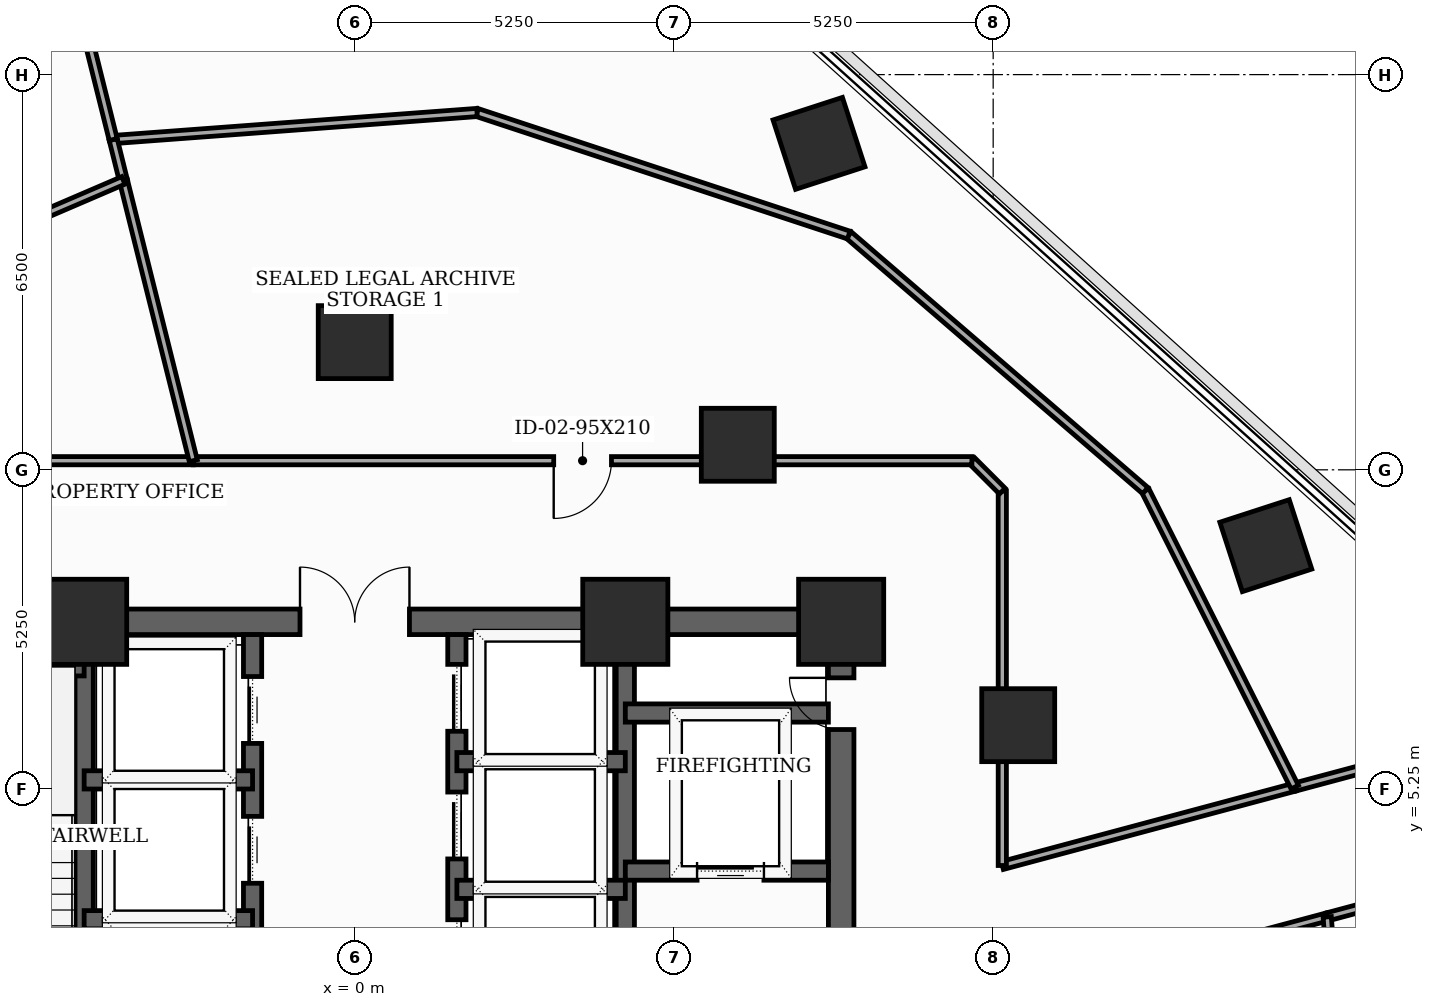
"""IFC4 building model, lengths in metres.
Left out: names, types, materials, properties, quantities, classifications, styles, units other than length and angle.
Written with IfcOpenShell. Run it as: python <this file> out.ifc"""

import sys

from ifc_helpers import new_model, si_unit, direction, frame, frame_2d, origin, origin_2d, place, context, subcontext, project, spatial, rectangle, extrude, element, fill, save


model = new_model("IFC4")
c1 = context("Model", 3, precision=1e-05, world=origin(), true_north=direction((0.0, 1.0)))
c2 = subcontext(c1, "Body", "Model", "MODEL_VIEW")
j1 = project(units=[si_unit("LENGTHUNIT", "METRE"), si_unit("PLANEANGLEUNIT", "RADIAN")], contexts=[c1])
p1 = place(None, origin())
s1 = spatial("IfcSite", under=j1, at=p1, CompositionType="ELEMENT")
p2 = place(p1, origin())
s2 = spatial("IfcBuilding", under=s1, at=p2, CompositionType="ELEMENT")
p3 = place(p2, frame((0.0, 0.0, 112.5)))
s3 = spatial("IfcBuildingStorey", under=s2, at=p3, CompositionType="ELEMENT", Elevation=112.5)
for number, where, z_axis, x_axis in (
    (1, (8.0, 8.0, 0.0), (0.0, 0.0, 1.0), (1.0, 0.0, 0.0)),
    (2, (4.45, 8.0, 0.0), (0.0, 0.0, 1.0), (1.0, 0.0, 0.0)),
    (3, (-4.45, 8.0, 0.0), (0.0, 0.0, 1.0), (1.0, 0.0, 0.0)),
):
    element("IfcColumn", number, at=place(p3, frame(where, z_axis=z_axis, x_axis=x_axis)), inside=s3, PredefinedType="COLUMN", context=c2, shape_type="SweptSolid", body=[
        extrude(rectangle(XDim=1.4, YDim=1.4, at=origin_2d()), origin(), (0.0, 0.0, 1.0), 3.7),
    ])
for number, where, z_axis, x_axis in (
    (4, (10.912, 6.3, 0.0), (0.0, 0.0, 1.0), (1.0, 0.0, 0.0)),
    (5, (6.3, 10.912, 0.0), (0.0, 0.0, 1.0), (1.0, 0.0, 0.0)),
    (6, (0.0, 12.6, 0.0), (0.0, 0.0, 1.0), (1.0, 0.0, 0.0)),
    (7, (14.984, 9.252, 0.0), (0.0, 0.0, 1.0), (0.951, 0.309, 0.0)),
    (8, (7.635, 15.869, 0.0), (0.0, 0.0, 1.0), (0.951, 0.309, 0.0)),
):
    element("IfcColumn", number, at=place(p3, frame(where, z_axis=z_axis, x_axis=x_axis)), inside=s3, PredefinedType="COLUMN", context=c2, shape_type="SweptSolid", body=[
        extrude(rectangle(XDim=1.2, YDim=1.2, at=origin_2d()), origin(), (0.0, 0.0, 1.0), 3.7),
    ])
p4 = place(p3, frame((8.0, -8.0, 0.0), z_axis=(0.0, 0.0, 1.0), x_axis=(0.0, 1.0, 0.0)))
e9 = element("IfcWall", 9, at=p4, inside=s3, PredefinedType="SHEAR", context=c2, shape_type="SweptSolid", body=[
    extrude(rectangle(XDim=16.0, YDim=0.42, at=frame_2d((8.0, 0.0))), origin(), (0.0, 0.0, 1.0), 3.5),
])
p5 = place(p4, frame((9.6, 0.0, 0.0)))
e10 = element("IfcOpeningElement", 10, at=p5, cuts=e9, PredefinedType="OPENING", context=c2, shape_type="SweptSolid", body=[
    extrude(rectangle(XDim=1.05, YDim=2.15, at=frame_2d((0.525, 1.075))), frame((0.0, 0.22, 0.0), z_axis=(0.0, -1.0, 0.0), x_axis=(1.0, 0.0, 0.0)), (0.0, 0.0, 1.0), 0.44),
])
p6 = place(p4, frame((14.229, 0.0, 0.0)))
e11 = element("IfcOpeningElement", 11, at=p6, cuts=e9, PredefinedType="OPENING", context=c2, shape_type="SweptSolid", body=[
    extrude(rectangle(XDim=0.85, YDim=2.02, at=frame_2d((0.425, 1.01))), frame((0.0, 0.22, 0.0), z_axis=(0.0, -1.0, 0.0), x_axis=(1.0, 0.0, 0.0)), (0.0, 0.0, 1.0), 0.44),
])
p7 = place(p3, frame((-8.0, 8.0, 0.0), z_axis=(0.0, 0.0, 1.0), x_axis=(1.0, 0.0, 0.0)))
e12 = element("IfcWall", 12, at=p7, inside=s3, PredefinedType="SHEAR", context=c2, shape_type="SweptSolid", body=[
    extrude(rectangle(XDim=16.0, YDim=0.42, at=frame_2d((8.0, 0.0))), origin(), (0.0, 0.0, 1.0), 3.5),
])
p8 = place(p7, frame((7.1, 0.0, 0.0)))
e13 = element("IfcOpeningElement", 13, at=p8, cuts=e12, PredefinedType="OPENING", context=c2, shape_type="SweptSolid", body=[
    extrude(rectangle(XDim=1.8, YDim=2.15, at=frame_2d((0.9, 1.075))), frame((0.0, 0.22, 0.0), z_axis=(0.0, -1.0, 0.0), x_axis=(1.0, 0.0, 0.0)), (0.0, 0.0, 1.0), 0.44),
])
for number, where, z_axis, x_axis in (
    (14, (-4.45, -7.79, 0.0), (0.0, 0.0, 1.0), (0.0, 1.0, 0.0)),
    (15, (4.45, -7.79, 0.0), (0.0, 0.0, 1.0), (0.0, 1.0, 0.0)),
):
    element("IfcWall", number, at=place(p3, frame(where, z_axis=z_axis, x_axis=x_axis)), inside=s3, PredefinedType="SHEAR", context=c2, shape_type="SweptSolid", body=[
        extrude(rectangle(XDim=15.58, YDim=0.3, at=frame_2d((7.79, 0.0))), origin(), (0.0, 0.0, 1.0), 3.5),
    ])
p9 = place(p3, frame((-7.79, 7.26, 0.0), z_axis=(0.0, 0.0, 1.0), x_axis=(1.0, 0.0, 0.0)))
e16 = element("IfcWall", 16, at=p9, inside=s3, PredefinedType="SHEAR", context=c2, shape_type="SweptSolid", body=[
    extrude(rectangle(XDim=3.34, YDim=0.3, at=frame_2d((1.67, 0.0))), origin(), (0.0, 0.0, 1.0), 3.5),
])
p10 = place(p3, frame((4.45, 3.9, 0.0), z_axis=(0.0, 0.0, 1.0), x_axis=(1.0, 0.0, 0.0)))
e17 = element("IfcWall", 17, at=p10, inside=s3, PredefinedType="SHEAR", context=c2, shape_type="SweptSolid", body=[
    extrude(rectangle(XDim=3.34, YDim=0.3, at=frame_2d((1.67, 0.0))), origin(), (0.0, 0.0, 1.0), 3.5),
])
p11 = place(p10, frame((1.18, 0.0, 0.0)))
e18 = element("IfcOpeningElement", 18, at=p11, cuts=e17, PredefinedType="OPENING", context=c2, shape_type="SweptSolid", body=[
    extrude(rectangle(XDim=1.1, YDim=2.1, at=frame_2d((0.55, 1.05))), frame((0.0, 0.16, 0.0), z_axis=(0.0, -1.0, 0.0), x_axis=(1.0, 0.0, 0.0)), (0.0, 0.0, 1.0), 0.32),
])
p12 = place(p3, frame((4.45, 6.5, 0.0), z_axis=(0.0, 0.0, 1.0), x_axis=(1.0, 0.0, 0.0)))
e19 = element("IfcWall", 19, at=p12, inside=s3, PredefinedType="SHEAR", context=c2, shape_type="SweptSolid", body=[
    extrude(rectangle(XDim=3.34, YDim=0.3, at=frame_2d((1.67, 0.0))), origin(), (0.0, 0.0, 1.0), 3.5),
])
p13 = place(p3, frame((-1.68, -4.85, 0.0), z_axis=(0.0, 0.0, 1.0), x_axis=(0.0, 1.0, 0.0)))
e20 = element("IfcWall", 20, at=p13, inside=s3, PredefinedType="SHEAR", context=c2, shape_type="SweptSolid", body=[
    extrude(rectangle(XDim=12.64, YDim=0.3, at=frame_2d((6.32, 0.0))), origin(), (0.0, 0.0, 1.0), 3.5),
])
p14 = place(p13, frame((3.95, 0.0, 0.0)))
e21 = element("IfcOpeningElement", 21, at=p14, cuts=e20, PredefinedType="OPENING", context=c2, shape_type="SweptSolid", body=[
    extrude(rectangle(XDim=1.1, YDim=2.1, at=frame_2d((0.55, 1.05))), frame((0.0, 0.16, 0.0), z_axis=(0.0, -1.0, 0.0), x_axis=(1.0, 0.0, 0.0)), (0.0, 0.0, 1.0), 0.32),
])
p15 = place(p13, frame((6.25, 0.0, 0.0)))
e22 = element("IfcOpeningElement", 22, at=p15, cuts=e20, PredefinedType="OPENING", context=c2, shape_type="SweptSolid", body=[
    extrude(rectangle(XDim=1.1, YDim=2.1, at=frame_2d((0.55, 1.05))), frame((0.0, 0.16, 0.0), z_axis=(0.0, -1.0, 0.0), x_axis=(1.0, 0.0, 0.0)), (0.0, 0.0, 1.0), 0.32),
])
p16 = place(p13, frame((8.55, 0.0, 0.0)))
e23 = element("IfcOpeningElement", 23, at=p16, cuts=e20, PredefinedType="OPENING", context=c2, shape_type="SweptSolid", body=[
    extrude(rectangle(XDim=1.1, YDim=2.1, at=frame_2d((0.55, 1.05))), frame((0.0, 0.16, 0.0), z_axis=(0.0, -1.0, 0.0), x_axis=(1.0, 0.0, 0.0)), (0.0, 0.0, 1.0), 0.32),
])
p17 = place(p13, frame((10.85, 0.0, 0.0)))
e24 = element("IfcOpeningElement", 24, at=p17, cuts=e20, PredefinedType="OPENING", context=c2, shape_type="SweptSolid", body=[
    extrude(rectangle(XDim=1.1, YDim=2.1, at=frame_2d((0.55, 1.05))), frame((0.0, 0.16, 0.0), z_axis=(0.0, -1.0, 0.0), x_axis=(1.0, 0.0, 0.0)), (0.0, 0.0, 1.0), 0.32),
])
p18 = place(p13, frame((0.45, 0.0, 0.0)))
e25 = element("IfcOpeningElement", 25, at=p18, cuts=e20, PredefinedType="OPENING", context=c2, shape_type="SweptSolid", body=[
    extrude(rectangle(XDim=0.85, YDim=2.02, at=frame_2d((0.425, 1.01))), frame((0.0, 0.16, 0.0), z_axis=(0.0, -1.0, 0.0), x_axis=(1.0, 0.0, 0.0)), (0.0, 0.0, 1.0), 0.32),
])
p19 = place(p13, frame((2.05, 0.0, 0.0)))
e26 = element("IfcOpeningElement", 26, at=p19, cuts=e20, PredefinedType="OPENING", context=c2, shape_type="SweptSolid", body=[
    extrude(rectangle(XDim=0.85, YDim=2.02, at=frame_2d((0.425, 1.01))), frame((0.0, 0.16, 0.0), z_axis=(0.0, -1.0, 0.0), x_axis=(1.0, 0.0, 0.0)), (0.0, 0.0, 1.0), 0.32),
])
p20 = place(p3, frame((1.68, -4.85, 0.0), z_axis=(0.0, 0.0, 1.0), x_axis=(0.0, 1.0, 0.0)))
e27 = element("IfcWall", 27, at=p20, inside=s3, PredefinedType="SHEAR", context=c2, shape_type="SweptSolid", body=[
    extrude(rectangle(XDim=12.64, YDim=0.3, at=frame_2d((6.32, 0.0))), origin(), (0.0, 0.0, 1.0), 3.5),
])
p21 = place(p20, frame((0.55, 0.0, 0.0)))
e28 = element("IfcOpeningElement", 28, at=p21, cuts=e27, PredefinedType="OPENING", context=c2, shape_type="SweptSolid", body=[
    extrude(rectangle(XDim=1.1, YDim=2.1, at=frame_2d((0.55, 1.05))), frame((0.0, 0.16, 0.0), z_axis=(0.0, -1.0, 0.0), x_axis=(1.0, 0.0, 0.0)), (0.0, 0.0, 1.0), 0.32),
])
p22 = place(p20, frame((2.65, 0.0, 0.0)))
e29 = element("IfcOpeningElement", 29, at=p22, cuts=e27, PredefinedType="OPENING", context=c2, shape_type="SweptSolid", body=[
    extrude(rectangle(XDim=1.1, YDim=2.1, at=frame_2d((0.55, 1.05))), frame((0.0, 0.16, 0.0), z_axis=(0.0, -1.0, 0.0), x_axis=(1.0, 0.0, 0.0)), (0.0, 0.0, 1.0), 0.32),
])
p23 = place(p20, frame((4.75, 0.0, 0.0)))
e30 = element("IfcOpeningElement", 30, at=p23, cuts=e27, PredefinedType="OPENING", context=c2, shape_type="SweptSolid", body=[
    extrude(rectangle(XDim=1.1, YDim=2.1, at=frame_2d((0.55, 1.05))), frame((0.0, 0.16, 0.0), z_axis=(0.0, -1.0, 0.0), x_axis=(1.0, 0.0, 0.0)), (0.0, 0.0, 1.0), 0.32),
])
p24 = place(p20, frame((6.85, 0.0, 0.0)))
e31 = element("IfcOpeningElement", 31, at=p24, cuts=e27, PredefinedType="OPENING", context=c2, shape_type="SweptSolid", body=[
    extrude(rectangle(XDim=1.1, YDim=2.1, at=frame_2d((0.55, 1.05))), frame((0.0, 0.16, 0.0), z_axis=(0.0, -1.0, 0.0), x_axis=(1.0, 0.0, 0.0)), (0.0, 0.0, 1.0), 0.32),
])
p25 = place(p20, frame((8.95, 0.0, 0.0)))
e32 = element("IfcOpeningElement", 32, at=p25, cuts=e27, PredefinedType="OPENING", context=c2, shape_type="SweptSolid", body=[
    extrude(rectangle(XDim=1.1, YDim=2.1, at=frame_2d((0.55, 1.05))), frame((0.0, 0.16, 0.0), z_axis=(0.0, -1.0, 0.0), x_axis=(1.0, 0.0, 0.0)), (0.0, 0.0, 1.0), 0.32),
])
p26 = place(p20, frame((11.05, 0.0, 0.0)))
e33 = element("IfcOpeningElement", 33, at=p26, cuts=e27, PredefinedType="OPENING", context=c2, shape_type="SweptSolid", body=[
    extrude(rectangle(XDim=1.1, YDim=2.1, at=frame_2d((0.55, 1.05))), frame((0.0, 0.16, 0.0), z_axis=(0.0, -1.0, 0.0), x_axis=(1.0, 0.0, 0.0)), (0.0, 0.0, 1.0), 0.32),
])
for number, where, z_axis, x_axis in (
    (34, (-4.45, 3.1, 0.0), (0.0, 0.0, 1.0), (1.0, 0.0, 0.0)),
    (35, (-4.45, 5.4, 0.0), (0.0, 0.0, 1.0), (1.0, 0.0, 0.0)),
    (36, (1.68, 3.6, 0.0), (0.0, 0.0, 1.0), (1.0, 0.0, 0.0)),
    (37, (1.68, 5.7, 0.0), (0.0, 0.0, 1.0), (1.0, 0.0, 0.0)),
):
    element("IfcWall", number, at=place(p3, frame(where, z_axis=z_axis, x_axis=x_axis)), inside=s3, PredefinedType="SHEAR", context=c2, shape_type="SweptSolid", body=[
        extrude(rectangle(XDim=2.77, YDim=0.3, at=frame_2d((1.385, 0.0))), origin(), (0.0, 0.0, 1.0), 3.5),
    ])
p27 = place(p3, frame((15.46, 5.281, 0.0), z_axis=(0.0, 0.0, 1.0), x_axis=(-0.96591522342, -0.258858612306, 0.0)))
e38 = element("IfcWall", 38, at=p27, inside=s3, PredefinedType="PARTITIONING", context=c2, shape_type="SweptSolid", body=[
    extrude(rectangle(XDim=4.98, YDim=0.135, at=frame_2d((2.49, 0.0))), origin(), (0.0, 0.0, 1.0), 2.785),
])
p28 = place(p3, frame((10.65, 3.992, 0.0), z_axis=(0.0, 0.0, 1.0), x_axis=(0.0, 1.0, 0.0)))
e39 = element("IfcWall", 39, at=p28, inside=s3, PredefinedType="PARTITIONING", context=c2, shape_type="SweptSolid", body=[
    extrude(rectangle(XDim=6.158, YDim=0.135, at=frame_2d((3.079, 0.0))), origin(), (0.0, 0.0, 1.0), 2.785),
])
p29 = place(p3, frame((10.65, 10.15, 0.0), z_axis=(0.0, 0.0, 1.0), x_axis=(-0.707106781187, 0.707106781187, 0.0)))
e40 = element("IfcWall", 40, at=p29, inside=s3, PredefinedType="PARTITIONING", context=c2, shape_type="SweptSolid", body=[
    extrude(rectangle(XDim=0.707, YDim=0.135, at=frame_2d((0.354, 0.0))), origin(), (0.0, 0.0, 1.0), 3.125),
])
p30 = place(p3, frame((10.15, 10.65, 0.0), z_axis=(0.0, 0.0, 1.0), x_axis=(-1.0, 0.0, 0.0)))
e41 = element("IfcWall", 41, at=p30, inside=s3, PredefinedType="PARTITIONING", context=c2, shape_type="SweptSolid", body=[
    extrude(rectangle(XDim=12.805, YDim=0.135, at=frame_2d((6.402, 0.0))), origin(), (0.0, 0.0, 1.0), 2.785),
])
p31 = place(p30, frame((5.927, 0.0, 0.0)))
e42 = element("IfcOpeningElement", 42, at=p31, cuts=e41, PredefinedType="OPENING", context=c2, shape_type="SweptSolid", body=[
    extrude(rectangle(XDim=0.95, YDim=2.1, at=frame_2d((0.475, 1.05))), frame((0.0, 0.077, 0.0), z_axis=(0.0, -1.0, 0.0), x_axis=(1.0, 0.0, 0.0)), (0.0, 0.0, 1.0), 0.155),
])
p32 = place(p3, frame((15.994, 3.147, 0.0), z_axis=(0.0, 0.0, 1.0), x_axis=(0.965977255775, 0.258627031314, 0.0)))
e43 = element("IfcWall", 43, at=p32, inside=s3, PredefinedType="PARTITIONING", context=c2, shape_type="SweptSolid", body=[
    extrude(rectangle(XDim=2.536, YDim=0.135, at=frame_2d((1.268, 0.0))), origin(), (0.0, 0.0, 1.0), 3.125),
])
p33 = place(p3, frame((17.875, 5.928, 0.0), z_axis=(0.0, 0.0, 1.0), x_axis=(-0.96593933493, -0.258768624905, 0.0)))
e44 = element("IfcWall", 44, at=p33, inside=s3, PredefinedType="PARTITIONING", context=c2, shape_type="SweptSolid", body=[
    extrude(rectangle(XDim=2.5, YDim=0.135, at=frame_2d((1.25, 0.0))), origin(), (0.0, 0.0, 1.0), 3.5),
])
p34 = place(p3, frame((10.65, 1.715, 0.0), z_axis=(0.0, 0.0, 1.0), x_axis=(0.965927369368, 0.258813286187, 0.0)))
e45 = element("IfcWall", 45, at=p34, inside=s3, PredefinedType="PARTITIONING", context=c2, shape_type="SweptSolid", body=[
    extrude(rectangle(XDim=5.532, YDim=0.135, at=frame_2d((2.766, 0.0))), origin(), (0.0, 0.0, 1.0), 2.785),
])
p35 = place(p3, frame((-2.655, 10.65, 0.0), z_axis=(0.0, 0.0, 1.0), x_axis=(-1.0, 0.0, 0.0)))
e46 = element("IfcWall", 46, at=p35, inside=s3, PredefinedType="PARTITIONING", context=c2, shape_type="SweptSolid", body=[
    extrude(rectangle(XDim=7.495, YDim=0.135, at=frame_2d((3.748, 0.0))), origin(), (0.0, 0.0, 1.0), 2.785),
])
p36 = place(p3, frame((15.46, 5.281, 0.0), z_axis=(0.0, 0.0, 1.0), x_axis=(-0.45007231558, 0.892992111246, 0.0)))
e47 = element("IfcWall", 47, at=p36, inside=s3, PredefinedType="PARTITIONING", context=c2, shape_type="SweptSolid", body=[
    extrude(rectangle(XDim=5.461, YDim=0.135, at=frame_2d((2.731, 0.0))), origin(), (0.0, 0.0, 1.0), 2.785),
])
p37 = place(p3, frame((13.002, 10.158, 0.0), z_axis=(0.0, 0.0, 1.0), x_axis=(-0.757497901086, 0.652837598373, 0.0)))
e48 = element("IfcWall", 48, at=p37, inside=s3, PredefinedType="PARTITIONING", context=c2, shape_type="SweptSolid", body=[
    extrude(rectangle(XDim=6.438, YDim=0.135, at=frame_2d((3.219, 0.0))), origin(), (0.0, 0.0, 1.0), 3.5),
])
p38 = place(p3, frame((8.125, 14.361, 0.0), z_axis=(0.0, 0.0, 1.0), x_axis=(-0.949709761003, 0.313131553592, 0.0)))
e49 = element("IfcWall", 49, at=p38, inside=s3, PredefinedType="PARTITIONING", context=c2, shape_type="SweptSolid", body=[
    extrude(rectangle(XDim=6.438, YDim=0.135, at=frame_2d((3.219, 0.0))), origin(), (0.0, 0.0, 1.0), 2.785),
])
p39 = place(p3, frame((2.011, 16.377, 0.0), z_axis=(0.0, 0.0, 1.0), x_axis=(-0.997244499183, -0.074184963764, 0.0)))
e50 = element("IfcWall", 50, at=p39, inside=s3, PredefinedType="PARTITIONING", context=c2, shape_type="SweptSolid", body=[
    extrude(rectangle(XDim=6.0, YDim=0.135, at=frame_2d((3.0, 0.0))), origin(), (0.0, 0.0, 1.0), 2.785),
])
p40 = place(p3, frame((-3.972, 15.932, 0.0), z_axis=(0.0, 0.0, 1.0), x_axis=(0.241207800827, -0.970473491045, 0.0)))
e51 = element("IfcWall", 51, at=p40, inside=s3, PredefinedType="PARTITIONING", context=c2, shape_type="SweptSolid", body=[
    extrude(rectangle(XDim=0.692, YDim=0.135, at=frame_2d((0.346, 0.0))), origin(), (0.0, 0.0, 1.0), 3.5),
])
p41 = place(p3, frame((-3.805, 15.26, 0.0), z_axis=(0.0, 0.0, 1.0), x_axis=(0.242015711327, -0.970272330571, 0.0)))
e52 = element("IfcWall", 52, at=p41, inside=s3, PredefinedType="PARTITIONING", context=c2, shape_type="SweptSolid", body=[
    extrude(rectangle(XDim=4.751, YDim=0.135, at=frame_2d((2.376, 0.0))), origin(), (0.0, 0.0, 1.0), 2.785),
])
p42 = place(p3, frame((15.994, 3.147, 0.0), z_axis=(0.0, 0.0, 1.0), x_axis=(0.074061203772, -0.99725369796, 0.0)))
e53 = element("IfcWall", 53, at=p42, inside=s3, PredefinedType="PARTITIONING", context=c2, shape_type="SweptSolid", body=[
    extrude(rectangle(XDim=5.172, YDim=0.135, at=frame_2d((2.586, 0.0))), origin(), (0.0, 0.0, 1.0), 2.785),
])
p43 = place(p3, frame((-7.646, 30.665, 0.0), z_axis=(0.0, 0.0, 1.0), x_axis=(0.241964325752, -0.970285146265, 0.0)))
e54 = element("IfcWall", 54, at=p43, inside=s3, PredefinedType="PARTITIONING", context=c2, shape_type="SweptSolid", body=[
    extrude(rectangle(XDim=15.184, YDim=0.135, at=frame_2d((7.592, 0.0))), origin(), (0.0, 0.0, 1.0), 2.935),
])
p44 = place(p43, frame((7.132, 0.0, 0.0)))
e55 = element("IfcOpeningElement", 55, at=p44, cuts=e54, PredefinedType="OPENING", context=c2, shape_type="SweptSolid", body=[
    extrude(rectangle(XDim=0.92, YDim=2.1, at=frame_2d((0.46, 1.05))), frame((0.0, 0.077, 0.0), z_axis=(0.0, -1.0, 0.0), x_axis=(1.0, 0.0, 0.0)), (0.0, 0.0, 1.0), 0.155),
])
p45 = place(p3, frame((-8.835, 13.099, 0.0), z_axis=(0.0, 0.0, 1.0), x_axis=(0.918803297785, 0.394715720463, 0.0)))
e56 = element("IfcWall", 56, at=p45, inside=s3, PredefinedType="PARTITIONING", context=c2, shape_type="SweptSolid", body=[
    extrude(rectangle(XDim=5.475, YDim=0.135, at=frame_2d((2.737, 0.0))), origin(), (0.0, 0.0, 1.0), 2.785),
])
p46 = place(p6, origin())
e57 = element("IfcDoor", 57, at=p46, inside=s3, OperationType="SINGLE_SWING_RIGHT", PredefinedType="TRAPDOOR", context=c2, shape_type="SweptSolid", body=[
    extrude(rectangle(XDim=0.85, YDim=2.02, at=frame_2d((0.425, 1.01))), frame((0.0, 0.025, 0.0), z_axis=(0.0, -1.0, 0.0), x_axis=(1.0, 0.0, 0.0)), (0.0, 0.0, 1.0), 0.05),
])
fill(e11, e57)
p47 = place(p8, origin())
e58 = element("IfcDoor", 58, at=p47, inside=s3, OperationType="DOUBLE_DOOR_SINGLE_SWING", PredefinedType="DOOR", context=c2, shape_type="SweptSolid", body=[
    extrude(rectangle(XDim=1.8, YDim=2.15, at=frame_2d((0.9, 1.075))), frame((0.0, 0.025, 0.0), z_axis=(0.0, -1.0, 0.0), x_axis=(1.0, 0.0, 0.0)), (0.0, 0.0, 1.0), 0.05),
])
fill(e13, e58)
p48 = place(p11, origin())
e59 = element("IfcDoor", 59, at=p48, inside=s3, OperationType="SLIDING_TO_LEFT", PredefinedType="DOOR", context=c2, shape_type="SweptSolid", body=[
    extrude(rectangle(XDim=1.1, YDim=2.1, at=frame_2d((0.55, 1.05))), frame((0.0, 0.025, 0.0), z_axis=(0.0, -1.0, 0.0), x_axis=(1.0, 0.0, 0.0)), (0.0, 0.0, 1.0), 0.05),
])
fill(e18, e59)
p49 = place(p16, origin())
e60 = element("IfcDoor", 60, at=p49, inside=s3, OperationType="SLIDING_TO_LEFT", PredefinedType="DOOR", context=c2, shape_type="SweptSolid", body=[
    extrude(rectangle(XDim=1.1, YDim=2.1, at=frame_2d((0.55, 1.05))), frame((0.0, 0.025, 0.0), z_axis=(0.0, -1.0, 0.0), x_axis=(1.0, 0.0, 0.0)), (0.0, 0.0, 1.0), 0.05),
])
fill(e23, e60)
p50 = place(p17, origin())
e61 = element("IfcDoor", 61, at=p50, inside=s3, OperationType="SLIDING_TO_LEFT", PredefinedType="DOOR", context=c2, shape_type="SweptSolid", body=[
    extrude(rectangle(XDim=1.1, YDim=2.1, at=frame_2d((0.55, 1.05))), frame((0.0, 0.025, 0.0), z_axis=(0.0, -1.0, 0.0), x_axis=(1.0, 0.0, 0.0)), (0.0, 0.0, 1.0), 0.05),
])
fill(e24, e61)
p51 = place(p24, origin())
e62 = element("IfcDoor", 62, at=p51, inside=s3, OperationType="SLIDING_TO_LEFT", PredefinedType="DOOR", context=c2, shape_type="SweptSolid", body=[
    extrude(rectangle(XDim=1.1, YDim=2.1, at=frame_2d((0.55, 1.05))), frame((0.0, 0.025, 0.0), z_axis=(0.0, -1.0, 0.0), x_axis=(1.0, 0.0, 0.0)), (0.0, 0.0, 1.0), 0.05),
])
fill(e31, e62)
p52 = place(p25, origin())
e63 = element("IfcDoor", 63, at=p52, inside=s3, OperationType="SLIDING_TO_LEFT", PredefinedType="DOOR", context=c2, shape_type="SweptSolid", body=[
    extrude(rectangle(XDim=1.1, YDim=2.1, at=frame_2d((0.55, 1.05))), frame((0.0, 0.025, 0.0), z_axis=(0.0, -1.0, 0.0), x_axis=(1.0, 0.0, 0.0)), (0.0, 0.0, 1.0), 0.05),
])
fill(e32, e63)
p53 = place(p26, origin())
e64 = element("IfcDoor", 64, at=p53, inside=s3, OperationType="SLIDING_TO_LEFT", PredefinedType="DOOR", context=c2, shape_type="SweptSolid", body=[
    extrude(rectangle(XDim=1.1, YDim=2.1, at=frame_2d((0.55, 1.05))), frame((0.0, 0.025, 0.0), z_axis=(0.0, -1.0, 0.0), x_axis=(1.0, 0.0, 0.0)), (0.0, 0.0, 1.0), 0.05),
])
fill(e33, e64)
p54 = place(p31, origin())
e65 = element("IfcDoor", 65, at=p54, inside=s3, OperationType="SINGLE_SWING_RIGHT", PredefinedType="DOOR", context=c2, shape_type="SweptSolid", body=[
    extrude(rectangle(XDim=0.95, YDim=2.1, at=frame_2d((0.475, 1.05))), frame((0.0, 0.025, 0.0), z_axis=(0.0, -1.0, 0.0), x_axis=(1.0, 0.0, 0.0)), (0.0, 0.0, 1.0), 0.05),
])
fill(e42, e65)
save(model, sys.argv[1])
